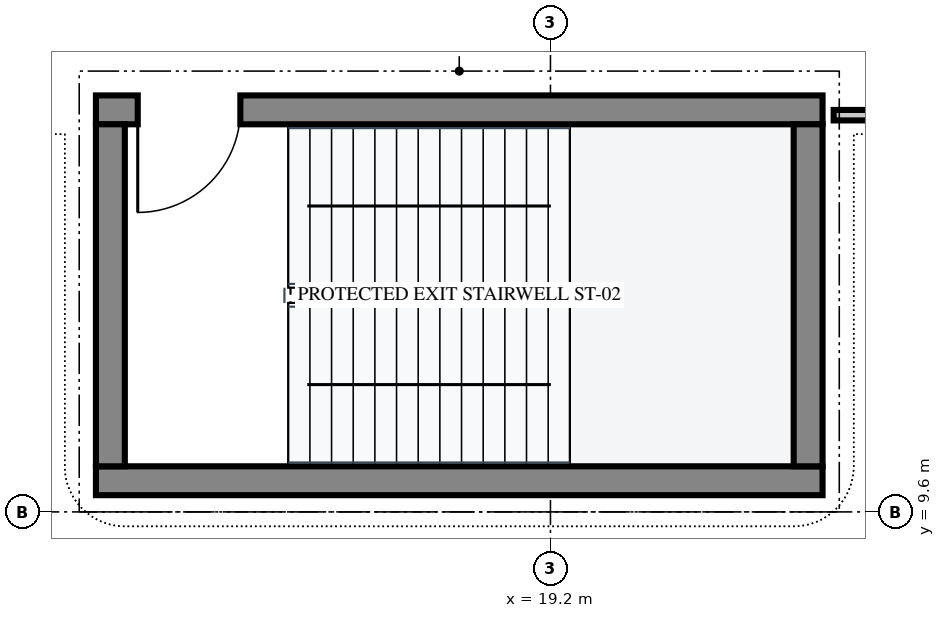
"""IFC4 building model, lengths in metres.
Left out: names, types, materials, properties, quantities, classifications, styles, units other than length and angle.
Written with IfcOpenShell. Run it as: python <this file> out.ifc"""

import sys

from ifc_helpers import new_model, si_unit, direction, frame, frame_2d, origin, place, context, subcontext, project, spatial, rectangle, extrude, element, fill, save


model = new_model("IFC4")
c1 = context("Model", 3, precision=1e-05, world=origin(), true_north=direction((0.0, 1.0)))
c2 = subcontext(c1, "Body", "Model", "MODEL_VIEW")
j1 = project(units=[si_unit("LENGTHUNIT", "METRE"), si_unit("PLANEANGLEUNIT", "RADIAN")], contexts=[c1])
p1 = place(None, origin())
s1 = spatial("IfcSite", under=j1, at=p1, CompositionType="ELEMENT")
p2 = place(p1, origin())
s2 = spatial("IfcBuilding", under=s1, at=p2, CompositionType="ELEMENT")
p3 = place(p2, frame((0.0, 0.0, 5.4)))
s3 = spatial("IfcBuildingStorey", under=s2, at=p3, CompositionType="ELEMENT", Elevation=5.4)
p4 = place(p3, frame((13.22, 10.01, 0.0), z_axis=(0.0, 0.0, 1.0), x_axis=(1.0, 0.0, 0.0)))
e1 = element("IfcWall", 1, at=p4, inside=s3, PredefinedType="SHEAR", context=c2, shape_type="SweptSolid", body=[
    extrude(rectangle(XDim=9.56, YDim=0.38, at=frame_2d((4.78, 0.0))), origin(), (0.0, 0.0, 1.0), 4.505),
])
p5 = place(p3, frame((13.22, 14.89, 0.0), z_axis=(0.0, 0.0, 1.0), x_axis=(1.0, 0.0, 0.0)))
e2 = element("IfcWall", 2, at=p5, inside=s3, PredefinedType="SHEAR", context=c2, shape_type="SweptSolid", body=[
    extrude(rectangle(XDim=9.56, YDim=0.38, at=frame_2d((4.78, 0.0))), origin(), (0.0, 0.0, 1.0), 4.505),
])
p6 = place(p5, frame((0.55, 0.0, 0.0)))
e3 = element("IfcOpeningElement", 3, at=p6, cuts=e2, PredefinedType="OPENING", context=c2, shape_type="SweptSolid", body=[
    extrude(rectangle(XDim=1.35, YDim=2.2, at=frame_2d((0.675, 1.1))), frame((0.0, 0.202, 0.0), z_axis=(0.0, -1.0, 0.0), x_axis=(1.0, 0.0, 0.0)), (0.0, 0.0, 1.0), 0.404),
])
for number, where, z_axis, x_axis in (
    (4, (22.59, 10.2, 0.0), (0.0, 0.0, 1.0), (0.0, 1.0, 0.0)),
    (5, (13.41, 10.2, 0.0), (0.0, 0.0, 1.0), (0.0, 1.0, 0.0)),
):
    element("IfcWall", number, at=place(p3, frame(where, z_axis=z_axis, x_axis=x_axis)), inside=s3, PredefinedType="SHEAR", context=c2, shape_type="SweptSolid", body=[
        extrude(rectangle(XDim=4.5, YDim=0.38, at=frame_2d((2.25, 0.0))), origin(), (0.0, 0.0, 1.0), 4.505),
    ])
p7 = place(p3, frame((22.926, 14.82, 0.0), z_axis=(0.0, 0.0, 1.0), x_axis=(1.0, 0.0, 0.0)))
e6 = element("IfcWall", 6, at=p7, inside=s3, PredefinedType="PARTITIONING", context=c2, shape_type="SweptSolid", body=[
    extrude(rectangle(XDim=12.954, YDim=0.138, at=frame_2d((6.477, 0.0))), origin(), (0.0, 0.0, 1.0), 4.505),
])
p8 = place(p7, frame((5.997, 0.0, 0.0)))
e7 = element("IfcOpeningElement", 7, at=p8, cuts=e6, PredefinedType="OPENING", context=c2, shape_type="SweptSolid", body=[
    extrude(rectangle(XDim=0.96, YDim=2.13, at=frame_2d((0.48, 1.065))), frame((0.0, 0.081, 0.0), z_axis=(0.0, -1.0, 0.0), x_axis=(1.0, 0.0, 0.0)), (0.0, 0.0, 1.0), 0.162),
])
p9 = place(p6, frame((1.35, 0.0, 0.0), z_axis=(0.0, 0.0, 1.0), x_axis=(-1.0, 0.0, 0.0)))
e8 = element("IfcDoor", 8, at=p9, inside=s3, OperationType="SINGLE_SWING_RIGHT", PredefinedType="DOOR", context=c2, shape_type="SweptSolid", body=[
    extrude(rectangle(XDim=1.35, YDim=2.2, at=frame_2d((0.675, 1.1))), frame((0.0, 0.025, 0.0), z_axis=(0.0, -1.0, 0.0), x_axis=(1.0, 0.0, 0.0)), (0.0, 0.0, 1.0), 0.05),
])
fill(e3, e8)
save(model, sys.argv[1])
